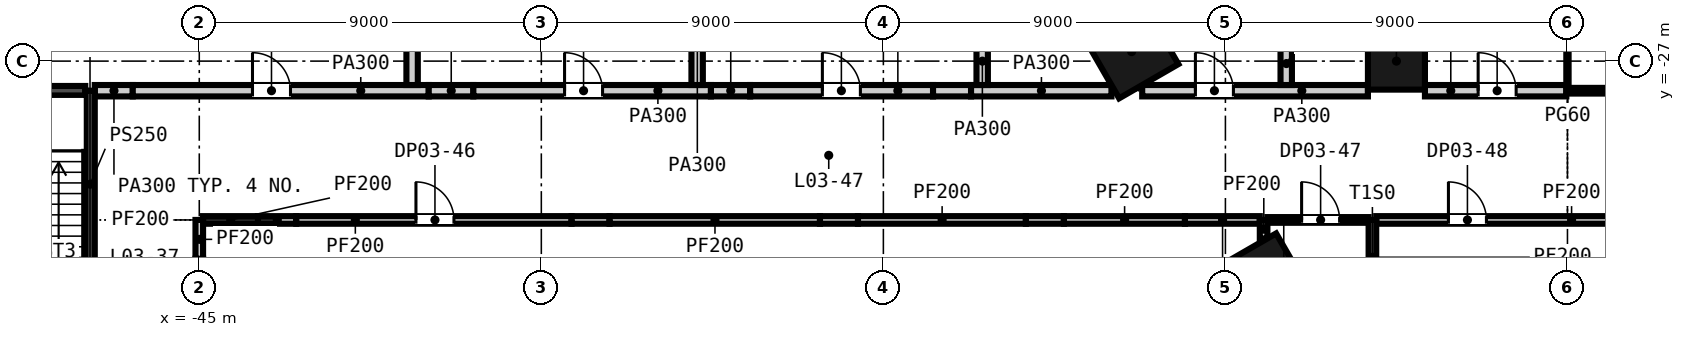
"""IFC4 building model, lengths in metres.
Left out: names, types, materials, properties, quantities, classifications, styles, units other than length and angle.
Written with IfcOpenShell. Run it as: python <this file> out.ifc"""

import sys

from ifc_helpers import new_model, si_unit, direction, frame, frame_2d, origin, origin_2d, place, context, subcontext, project, spatial, rectangle, extrude, element, fill, save


model = new_model("IFC4")
c1 = context("Model", 3, precision=1e-05, world=origin(), true_north=direction((0.0, 1.0)))
c2 = subcontext(c1, "Body", "Model", "MODEL_VIEW")
j1 = project(units=[si_unit("LENGTHUNIT", "METRE"), si_unit("PLANEANGLEUNIT", "RADIAN")], contexts=[c1])
p1 = place(None, origin())
s1 = spatial("IfcSite", under=j1, at=p1, CompositionType="ELEMENT")
p2 = place(p1, origin())
s2 = spatial("IfcBuilding", under=s1, at=p2, CompositionType="ELEMENT")
p3 = place(p2, frame((0.0, 0.0, 22.5)))
s3 = spatial("IfcBuildingStorey", under=s2, at=p3, CompositionType="ELEMENT", Elevation=22.5)
for number, where, z_axis, x_axis in (
    (1, (-20.467, -26.75, -0.3), (0.0, 0.0, 1.0), (0.5, -0.866, 0.0)),
    (2, (-16.995, -32.763, -0.3), (0.0, 0.0, 1.0), (0.5, -0.866, 0.0)),
):
    element("IfcColumn", number, at=place(p3, frame(where, z_axis=z_axis, x_axis=x_axis)), inside=s3, PredefinedType="COLUMN", context=c2, shape_type="SweptSolid", body=[
        extrude(rectangle(XDim=1.8, YDim=1.8, at=origin_2d()), origin(), (0.0, 0.0, 1.0), 4.5),
    ])
p4 = place(p3, frame((-13.5, -27.0, -0.3), z_axis=(0.0, 0.0, 1.0), x_axis=(1.0, 0.0, 0.0)))
e3 = element("IfcColumn", 3, at=p4, inside=s3, PredefinedType="COLUMN", context=c2, shape_type="SweptSolid", body=[
    extrude(rectangle(XDim=1.5, YDim=1.5, at=origin_2d()), origin(), (0.0, 0.0, 1.0), 4.5),
])
p5 = place(p3, frame((-44.9, -31.179, 0.0), z_axis=(0.0, 0.0, 1.0), x_axis=(1.0, 0.0, 0.0)))
e4 = element("IfcWall", 4, at=p5, inside=s3, PredefinedType="PARTITIONING", context=c2, shape_type="SweptSolid", body=[
    extrude(rectangle(XDim=1.445, YDim=0.2, at=frame_2d((0.723, 0.0))), origin(), (0.0, 0.0, 1.0), 4.2),
])
p6 = place(p3, frame((-43.455, -31.179, 0.0), z_axis=(0.0, 0.0, 1.0), x_axis=(1.0, 0.0, 0.0)))
e5 = element("IfcWall", 5, at=p6, inside=s3, PredefinedType="PARTITIONING", context=c2, shape_type="SweptSolid", body=[
    extrude(rectangle(XDim=1.006, YDim=0.2, at=frame_2d((0.503, 0.0))), origin(), (0.0, 0.0, 1.0), 3.111),
])
p7 = place(p3, frame((-42.449, -31.179, 0.0), z_axis=(0.0, 0.0, 1.0), x_axis=(1.0, 0.0, 0.0)))
e6 = element("IfcWall", 6, at=p7, inside=s3, PredefinedType="PARTITIONING", context=c2, shape_type="SweptSolid", body=[
    extrude(rectangle(XDim=7.245, YDim=0.2, at=frame_2d((3.623, 0.0))), origin(), (0.0, 0.0, 1.0), 4.2),
])
p8 = place(p7, frame((3.15, 0.0, 0.0)))
e7 = element("IfcOpeningElement", 7, at=p8, cuts=e6, PredefinedType="OPENING", context=c2, shape_type="SweptSolid", body=[
    extrude(rectangle(XDim=1.0, YDim=2.1, at=frame_2d((0.5, 1.05))), frame((0.0, 0.11, 0.0), z_axis=(0.0, -1.0, 0.0), x_axis=(1.0, 0.0, 0.0)), (0.0, 0.0, 1.0), 0.22),
])
p9 = place(p3, frame((-35.204, -31.179, 0.0), z_axis=(0.0, 0.0, 1.0), x_axis=(1.0, 0.0, 0.0)))
e8 = element("IfcWall", 8, at=p9, inside=s3, PredefinedType="PARTITIONING", context=c2, shape_type="SweptSolid", body=[
    extrude(rectangle(XDim=1.0, YDim=0.2, at=frame_2d((0.5, 0.0))), origin(), (0.0, 0.0, 1.0), 3.111),
])
p10 = place(p3, frame((-34.204, -31.179, 0.0), z_axis=(0.0, 0.0, 1.0), x_axis=(1.0, 0.0, 0.0)))
e9 = element("IfcWall", 9, at=p10, inside=s3, PredefinedType="PARTITIONING", context=c2, shape_type="SweptSolid", body=[
    extrude(rectangle(XDim=5.536, YDim=0.2, at=frame_2d((2.768, 0.0))), origin(), (0.0, 0.0, 1.0), 4.2),
])
p11 = place(p3, frame((-28.668, -31.179, 0.0), z_axis=(0.0, 0.0, 1.0), x_axis=(1.0, 0.0, 0.0)))
e10 = element("IfcWall", 10, at=p11, inside=s3, PredefinedType="PARTITIONING", context=c2, shape_type="SweptSolid", body=[
    extrude(rectangle(XDim=1.0, YDim=0.2, at=frame_2d((0.5, 0.0))), origin(), (0.0, 0.0, 1.0), 3.286),
])
p12 = place(p3, frame((-27.668, -31.179, 0.0), z_axis=(0.0, 0.0, 1.0), x_axis=(1.0, 0.0, 0.0)))
e11 = element("IfcWall", 11, at=p12, inside=s3, PredefinedType="PARTITIONING", context=c2, shape_type="SweptSolid", body=[
    extrude(rectangle(XDim=4.418, YDim=0.2, at=frame_2d((2.209, 0.0))), origin(), (0.0, 0.0, 1.0), 4.2),
])
p13 = place(p3, frame((-23.25, -31.179, 0.0), z_axis=(0.0, 0.0, 1.0), x_axis=(1.0, 0.0, 0.0)))
e12 = element("IfcWall", 12, at=p13, inside=s3, PredefinedType="PARTITIONING", context=c2, shape_type="SweptSolid", body=[
    extrude(rectangle(XDim=1.0, YDim=0.2, at=frame_2d((0.5, 0.0))), origin(), (0.0, 0.0, 1.0), 3.441),
])
p14 = place(p3, frame((-22.25, -31.179, 0.0), z_axis=(0.0, 0.0, 1.0), x_axis=(1.0, 0.0, 0.0)))
e13 = element("IfcWall", 13, at=p14, inside=s3, PredefinedType="PARTITIONING", context=c2, shape_type="SweptSolid", body=[
    extrude(rectangle(XDim=3.185, YDim=0.2, at=frame_2d((1.593, 0.0))), origin(), (0.0, 0.0, 1.0), 4.2),
])
p15 = place(p3, frame((-19.065, -31.179, 0.0), z_axis=(0.0, 0.0, 1.0), x_axis=(1.0, 0.0, 0.0)))
e14 = element("IfcWall", 14, at=p15, inside=s3, PredefinedType="PARTITIONING", context=c2, shape_type="SweptSolid", body=[
    extrude(rectangle(XDim=1.97, YDim=0.2, at=frame_2d((0.985, 0.0))), origin(), (0.0, 0.0, 1.0), 3.2),
])
p16 = place(p3, frame((-16.895, -31.179, 0.0), z_axis=(0.0, 0.0, 1.0), x_axis=(1.0, 0.0, 0.0)))
e15 = element("IfcWall", 15, at=p16, inside=s3, PredefinedType="PARTITIONING", context=c2, shape_type="SweptSolid", body=[
    extrude(rectangle(XDim=2.663, YDim=0.15, at=frame_2d((1.332, 0.0))), origin(), (0.0, 0.0, 1.0), 4.2),
])
p17 = place(p16, frame((0.9, 0.0, 0.0)))
e16 = element("IfcOpeningElement", 16, at=p17, cuts=e15, PredefinedType="OPENING", context=c2, shape_type="SweptSolid", body=[
    extrude(rectangle(XDim=1.0, YDim=2.1, at=frame_2d((0.5, 1.05))), frame((0.0, 0.085, 0.0), z_axis=(0.0, -1.0, 0.0), x_axis=(1.0, 0.0, 0.0)), (0.0, 0.0, 1.0), 0.17),
])
p18 = place(p3, frame((-14.032, -31.179, 0.0), z_axis=(0.0, 0.0, 1.0), x_axis=(1.0, 0.0, 0.0)))
e17 = element("IfcWall", 17, at=p18, inside=s3, PredefinedType="PARTITIONING", context=c2, shape_type="SweptSolid", body=[
    extrude(rectangle(XDim=7.321, YDim=0.2, at=frame_2d((3.661, 0.0))), origin(), (0.0, 0.0, 1.0), 4.2),
])
p19 = place(p18, frame((1.9, 0.0, 0.0)))
e18 = element("IfcOpeningElement", 18, at=p19, cuts=e17, PredefinedType="OPENING", context=c2, shape_type="SweptSolid", body=[
    extrude(rectangle(XDim=1.0, YDim=2.1, at=frame_2d((0.5, 1.05))), frame((0.0, 0.11, 0.0), z_axis=(0.0, -1.0, 0.0), x_axis=(1.0, 0.0, 0.0)), (0.0, 0.0, 1.0), 0.22),
])
p20 = place(p3, frame((-51.0, -27.779, 0.0), z_axis=(0.0, 0.0, 1.0), x_axis=(1.0, 0.0, 0.0)))
e19 = element("IfcWall", 19, at=p20, inside=s3, PredefinedType="SHEAR", context=c2, shape_type="SweptSolid", body=[
    extrude(rectangle(XDim=3.0, YDim=0.25, at=frame_2d((1.5, 0.0))), origin(), (0.0, 0.0, 1.0), 4.2),
])
p21 = place(p3, frame((-47.75, -27.779, 0.0), z_axis=(0.0, 0.0, 1.0), x_axis=(1.0, 0.0, 0.0)))
e20 = element("IfcWall", 20, at=p21, inside=s3, PredefinedType="PARTITIONING", context=c2, shape_type="SweptSolid", body=[
    extrude(rectangle(XDim=1.0, YDim=0.3, at=frame_2d((0.5, 0.0))), origin(), (0.0, 0.0, 1.0), 3.667),
])
p22 = place(p3, frame((-46.75, -27.779, 0.0), z_axis=(0.0, 0.0, 1.0), x_axis=(1.0, 0.0, 0.0)))
e21 = element("IfcWall", 21, at=p22, inside=s3, PredefinedType="PARTITIONING", context=c2, shape_type="SweptSolid", body=[
    extrude(rectangle(XDim=7.788, YDim=0.3, at=frame_2d((3.894, 0.0))), origin(), (0.0, 0.0, 1.0), 4.2),
])
p23 = place(p22, frame((3.15, 0.0, 0.0)))
e22 = element("IfcOpeningElement", 22, at=p23, cuts=e21, PredefinedType="OPENING", context=c2, shape_type="SweptSolid", body=[
    extrude(rectangle(XDim=1.0, YDim=2.1, at=frame_2d((0.5, 1.05))), frame((0.0, 0.16, 0.0), z_axis=(0.0, -1.0, 0.0), x_axis=(1.0, 0.0, 0.0)), (0.0, 0.0, 1.0), 0.32),
])
p24 = place(p3, frame((-38.962, -27.779, 0.0), z_axis=(0.0, 0.0, 1.0), x_axis=(1.0, 0.0, 0.0)))
e23 = element("IfcWall", 23, at=p24, inside=s3, PredefinedType="PARTITIONING", context=c2, shape_type="SweptSolid", body=[
    extrude(rectangle(XDim=1.174, YDim=0.3, at=frame_2d((0.587, 0.0))), origin(), (0.0, 0.0, 1.0), 3.111),
])
p25 = place(p3, frame((-37.789, -27.779, 0.0), z_axis=(0.0, 0.0, 1.0), x_axis=(1.0, 0.0, 0.0)))
e24 = element("IfcWall", 24, at=p25, inside=s3, PredefinedType="PARTITIONING", context=c2, shape_type="SweptSolid", body=[
    extrude(rectangle(XDim=6.252, YDim=0.3, at=frame_2d((3.126, 0.0))), origin(), (0.0, 0.0, 1.0), 4.2),
])
p26 = place(p25, frame((2.4, 0.0, 0.0)))
e25 = element("IfcOpeningElement", 25, at=p26, cuts=e24, PredefinedType="OPENING", context=c2, shape_type="SweptSolid", body=[
    extrude(rectangle(XDim=1.0, YDim=2.1, at=frame_2d((0.5, 1.05))), frame((0.0, 0.16, 0.0), z_axis=(0.0, -1.0, 0.0), x_axis=(1.0, 0.0, 0.0)), (0.0, 0.0, 1.0), 0.32),
])
p27 = place(p3, frame((-31.537, -27.779, 0.0), z_axis=(0.0, 0.0, 1.0), x_axis=(1.0, 0.0, 0.0)))
e26 = element("IfcWall", 26, at=p27, inside=s3, PredefinedType="PARTITIONING", context=c2, shape_type="SweptSolid", body=[
    extrude(rectangle(XDim=1.032, YDim=0.3, at=frame_2d((0.516, 0.0))), origin(), (0.0, 0.0, 1.0), 3.111),
])
p28 = place(p3, frame((-30.505, -27.779, 0.0), z_axis=(0.0, 0.0, 1.0), x_axis=(1.0, 0.0, 0.0)))
e27 = element("IfcWall", 27, at=p28, inside=s3, PredefinedType="PARTITIONING", context=c2, shape_type="SweptSolid", body=[
    extrude(rectangle(XDim=4.812, YDim=0.3, at=frame_2d((2.406, 0.0))), origin(), (0.0, 0.0, 1.0), 4.2),
])
p29 = place(p28, frame((1.9, 0.0, 0.0)))
e28 = element("IfcOpeningElement", 28, at=p29, cuts=e27, PredefinedType="OPENING", context=c2, shape_type="SweptSolid", body=[
    extrude(rectangle(XDim=1.0, YDim=2.1, at=frame_2d((0.5, 1.05))), frame((0.0, 0.16, 0.0), z_axis=(0.0, -1.0, 0.0), x_axis=(1.0, 0.0, 0.0)), (0.0, 0.0, 1.0), 0.32),
])
p30 = place(p3, frame((-25.693, -27.779, 0.0), z_axis=(0.0, 0.0, 1.0), x_axis=(1.0, 0.0, 0.0)))
e29 = element("IfcWall", 29, at=p30, inside=s3, PredefinedType="PARTITIONING", context=c2, shape_type="SweptSolid", body=[
    extrude(rectangle(XDim=1.0, YDim=0.3, at=frame_2d((0.5, 0.0))), origin(), (0.0, 0.0, 1.0), 3.286),
])
p31 = place(p3, frame((-24.693, -27.779, 0.0), z_axis=(0.0, 0.0, 1.0), x_axis=(1.0, 0.0, 0.0)))
e30 = element("IfcWall", 30, at=p31, inside=s3, PredefinedType="PARTITIONING", context=c2, shape_type="SweptSolid", body=[
    extrude(rectangle(XDim=3.694, YDim=0.3, at=frame_2d((1.847, 0.0))), origin(), (0.0, 0.0, 1.0), 4.2),
])
p32 = place(p3, frame((-20.189, -27.779, 0.0), z_axis=(0.0, 0.0, 1.0), x_axis=(1.0, 0.0, 0.0)))
e31 = element("IfcWall", 31, at=p32, inside=s3, PredefinedType="PARTITIONING", context=c2, shape_type="SweptSolid", body=[
    extrude(rectangle(XDim=5.939, YDim=0.3, at=frame_2d((2.97, 0.0))), origin(), (0.0, 0.0, 1.0), 4.2),
])
p33 = place(p32, frame((1.4, 0.0, 0.0)))
e32 = element("IfcOpeningElement", 32, at=p33, cuts=e31, PredefinedType="OPENING", context=c2, shape_type="SweptSolid", body=[
    extrude(rectangle(XDim=1.0, YDim=2.1, at=frame_2d((0.5, 1.05))), frame((0.0, 0.16, 0.0), z_axis=(0.0, -1.0, 0.0), x_axis=(1.0, 0.0, 0.0)), (0.0, 0.0, 1.0), 0.32),
])
p34 = place(p3, frame((-12.75, -27.779, 0.0), z_axis=(0.0, 0.0, 1.0), x_axis=(1.0, 0.0, 0.0)))
e33 = element("IfcWall", 33, at=p34, inside=s3, PredefinedType="PARTITIONING", context=c2, shape_type="SweptSolid", body=[
    extrude(rectangle(XDim=3.72, YDim=0.3, at=frame_2d((1.86, 0.0))), origin(), (0.0, 0.0, 1.0), 4.2),
])
p35 = place(p34, frame((1.4, 0.0, 0.0)))
e34 = element("IfcOpeningElement", 34, at=p35, cuts=e33, PredefinedType="OPENING", context=c2, shape_type="SweptSolid", body=[
    extrude(rectangle(XDim=1.0, YDim=2.1, at=frame_2d((0.5, 1.05))), frame((0.0, 0.16, 0.0), z_axis=(0.0, -1.0, 0.0), x_axis=(1.0, 0.0, 0.0)), (0.0, 0.0, 1.0), 0.32),
])
p36 = place(p3, frame((-8.97, -27.779, 0.0), z_axis=(0.0, 0.0, 1.0), x_axis=(1.0, 0.0, 0.0)))
e35 = element("IfcWall", 35, at=p36, inside=s3, PredefinedType="PARTITIONING", context=c2, shape_type="SweptSolid", body=[
    extrude(rectangle(XDim=8.22, YDim=0.15, at=frame_2d((4.11, 0.0))), origin(), (0.0, 0.0, 1.0), 4.2),
])
p37 = place(p3, frame((-47.875, -34.6, 0.0), z_axis=(0.0, 0.0, 1.0), x_axis=(0.0, 1.0, 0.0)))
e36 = element("IfcWall", 36, at=p37, inside=s3, PredefinedType="SHEAR", context=c2, shape_type="SweptSolid", body=[
    extrude(rectangle(XDim=6.821, YDim=0.25, at=frame_2d((3.411, 0.0))), origin(), (0.0, 0.0, 1.0), 4.2),
])
p38 = place(p37, frame((0.65, 0.0, 0.0)))
e37 = element("IfcOpeningElement", 37, at=p38, cuts=e36, PredefinedType="OPENING", context=c2, shape_type="SweptSolid", body=[
    extrude(rectangle(XDim=1.2, YDim=2.1, at=frame_2d((0.6, 1.05))), frame((0.0, 0.135, 0.0), z_axis=(0.0, -1.0, 0.0), x_axis=(1.0, 0.0, 0.0)), (0.0, 0.0, 1.0), 0.27),
])
p39 = place(p3, frame((-45.0, -32.201, 0.0), z_axis=(0.0, 0.0, 1.0), x_axis=(0.0, 1.0, 0.0)))
e38 = element("IfcWall", 38, at=p39, inside=s3, PredefinedType="PARTITIONING", context=c2, shape_type="SweptSolid", body=[
    extrude(rectangle(XDim=1.022, YDim=0.2, at=frame_2d((0.511, 0.0))), origin(), (0.0, 0.0, 1.0), 4.2),
])
p40 = place(p3, frame((-39.4, -27.629, 0.0), z_axis=(0.0, 0.0, 1.0), x_axis=(0.0, 1.0, 0.0)))
e39 = element("IfcWall", 39, at=p40, inside=s3, PredefinedType="PARTITIONING", context=c2, shape_type="SweptSolid", body=[
    extrude(rectangle(XDim=4.537, YDim=0.3, at=frame_2d((2.268, 0.0))), origin(), (0.0, 0.0, 1.0), 4.2),
])
p41 = place(p3, frame((-31.9, -27.629, 0.0), z_axis=(0.0, 0.0, 1.0), x_axis=(0.0, 1.0, 0.0)))
e40 = element("IfcWall", 40, at=p41, inside=s3, PredefinedType="PARTITIONING", context=c2, shape_type="SweptSolid", body=[
    extrude(rectangle(XDim=4.161, YDim=0.3, at=frame_2d((2.081, 0.0))), origin(), (0.0, 0.0, 1.0), 4.2),
])
p42 = place(p3, frame((-24.4, -27.629, 0.0), z_axis=(0.0, 0.0, 1.0), x_axis=(0.0, 1.0, 0.0)))
e41 = element("IfcWall", 41, at=p42, inside=s3, PredefinedType="PARTITIONING", context=c2, shape_type="SweptSolid", body=[
    extrude(rectangle(XDim=1.256, YDim=0.3, at=frame_2d((0.628, 0.0))), origin(), (0.0, 0.0, 1.0), 3.286),
])
p43 = place(p3, frame((-16.995, -31.666, 0.0), z_axis=(0.0, 0.0, 1.0), x_axis=(0.0, 1.0, 0.0)))
e42 = element("IfcWall", 42, at=p43, inside=s3, PredefinedType="PARTITIONING", context=c2, shape_type="SweptSolid", body=[
    extrude(rectangle(XDim=0.487, YDim=0.2, at=frame_2d((0.244, 0.0))), origin(), (0.0, 0.0, 1.0), 4.2),
])
p44 = place(p3, frame((-16.4, -27.629, 0.0), z_axis=(0.0, 0.0, 1.0), x_axis=(0.0, 1.0, 0.0)))
e43 = element("IfcWall", 43, at=p44, inside=s3, PredefinedType="PARTITIONING", context=c2, shape_type="SweptSolid", body=[
    extrude(rectangle(XDim=1.129, YDim=0.3, at=frame_2d((0.564, 0.0))), origin(), (0.0, 0.0, 1.0), 3.667),
])
p45 = place(p3, frame((-14.132, -33.142, 0.0), z_axis=(0.0, 0.0, 1.0), x_axis=(0.0, 1.0, 0.0)))
e44 = element("IfcWall", 44, at=p45, inside=s3, PredefinedType="PARTITIONING", context=c2, shape_type="SweptSolid", body=[
    extrude(rectangle(XDim=1.963, YDim=0.2, at=frame_2d((0.982, 0.0))), origin(), (0.0, 0.0, 1.0), 4.2),
])
p46 = place(p3, frame((-9.0, -27.778, 0.0), z_axis=(0.0, 0.0, 1.0), x_axis=(0.0, 1.0, 0.0)))
e45 = element("IfcWall", 45, at=p46, inside=s3, PredefinedType="PARTITIONING", context=c2, shape_type="SweptSolid", body=[
    extrude(rectangle(XDim=12.288, YDim=0.06, at=frame_2d((6.144, 0.0))), origin(), (0.0, 0.0, 1.0), 4.2),
])
p47 = place(p23, origin())
e46 = element("IfcDoor", 46, at=p47, inside=s3, OperationType="SINGLE_SWING_LEFT", PredefinedType="DOOR", context=c2, shape_type="SweptSolid", body=[
    extrude(rectangle(XDim=1.0, YDim=2.1, at=frame_2d((0.5, 1.05))), frame((0.0, 0.025, 0.0), z_axis=(0.0, -1.0, 0.0), x_axis=(1.0, 0.0, 0.0)), (0.0, 0.0, 1.0), 0.05),
])
fill(e22, e46)
p48 = place(p26, origin())
e47 = element("IfcDoor", 47, at=p48, inside=s3, OperationType="SINGLE_SWING_LEFT", PredefinedType="DOOR", context=c2, shape_type="SweptSolid", body=[
    extrude(rectangle(XDim=1.0, YDim=2.1, at=frame_2d((0.5, 1.05))), frame((0.0, 0.025, 0.0), z_axis=(0.0, -1.0, 0.0), x_axis=(1.0, 0.0, 0.0)), (0.0, 0.0, 1.0), 0.05),
])
fill(e25, e47)
p49 = place(p29, origin())
e48 = element("IfcDoor", 48, at=p49, inside=s3, OperationType="SINGLE_SWING_LEFT", PredefinedType="DOOR", context=c2, shape_type="SweptSolid", body=[
    extrude(rectangle(XDim=1.0, YDim=2.1, at=frame_2d((0.5, 1.05))), frame((0.0, 0.025, 0.0), z_axis=(0.0, -1.0, 0.0), x_axis=(1.0, 0.0, 0.0)), (0.0, 0.0, 1.0), 0.05),
])
fill(e28, e48)
p50 = place(p33, origin())
e49 = element("IfcDoor", 49, at=p50, inside=s3, OperationType="SINGLE_SWING_LEFT", PredefinedType="DOOR", context=c2, shape_type="SweptSolid", body=[
    extrude(rectangle(XDim=1.0, YDim=2.1, at=frame_2d((0.5, 1.05))), frame((0.0, 0.025, 0.0), z_axis=(0.0, -1.0, 0.0), x_axis=(1.0, 0.0, 0.0)), (0.0, 0.0, 1.0), 0.05),
])
fill(e32, e49)
p51 = place(p35, origin())
e50 = element("IfcDoor", 50, at=p51, inside=s3, OperationType="SINGLE_SWING_LEFT", PredefinedType="DOOR", context=c2, shape_type="SweptSolid", body=[
    extrude(rectangle(XDim=1.0, YDim=2.1, at=frame_2d((0.5, 1.05))), frame((0.0, 0.025, 0.0), z_axis=(0.0, -1.0, 0.0), x_axis=(1.0, 0.0, 0.0)), (0.0, 0.0, 1.0), 0.05),
])
fill(e34, e50)
p52 = place(p8, origin())
e51 = element("IfcDoor", 51, at=p52, inside=s3, OperationType="SINGLE_SWING_LEFT", PredefinedType="DOOR", context=c2, shape_type="SweptSolid", body=[
    extrude(rectangle(XDim=1.0, YDim=2.1, at=frame_2d((0.5, 1.05))), frame((0.0, 0.025, 0.0), z_axis=(0.0, -1.0, 0.0), x_axis=(1.0, 0.0, 0.0)), (0.0, 0.0, 1.0), 0.05),
])
fill(e7, e51)
p53 = place(p17, origin())
e52 = element("IfcDoor", 52, at=p53, inside=s3, OperationType="SINGLE_SWING_LEFT", PredefinedType="DOOR", context=c2, shape_type="SweptSolid", body=[
    extrude(rectangle(XDim=1.0, YDim=2.1, at=frame_2d((0.5, 1.05))), frame((0.0, 0.025, 0.0), z_axis=(0.0, -1.0, 0.0), x_axis=(1.0, 0.0, 0.0)), (0.0, 0.0, 1.0), 0.05),
])
fill(e16, e52)
p54 = place(p19, origin())
e53 = element("IfcDoor", 53, at=p54, inside=s3, OperationType="SINGLE_SWING_LEFT", PredefinedType="DOOR", context=c2, shape_type="SweptSolid", body=[
    extrude(rectangle(XDim=1.0, YDim=2.1, at=frame_2d((0.5, 1.05))), frame((0.0, 0.025, 0.0), z_axis=(0.0, -1.0, 0.0), x_axis=(1.0, 0.0, 0.0)), (0.0, 0.0, 1.0), 0.05),
])
fill(e18, e53)
save(model, sys.argv[1])
